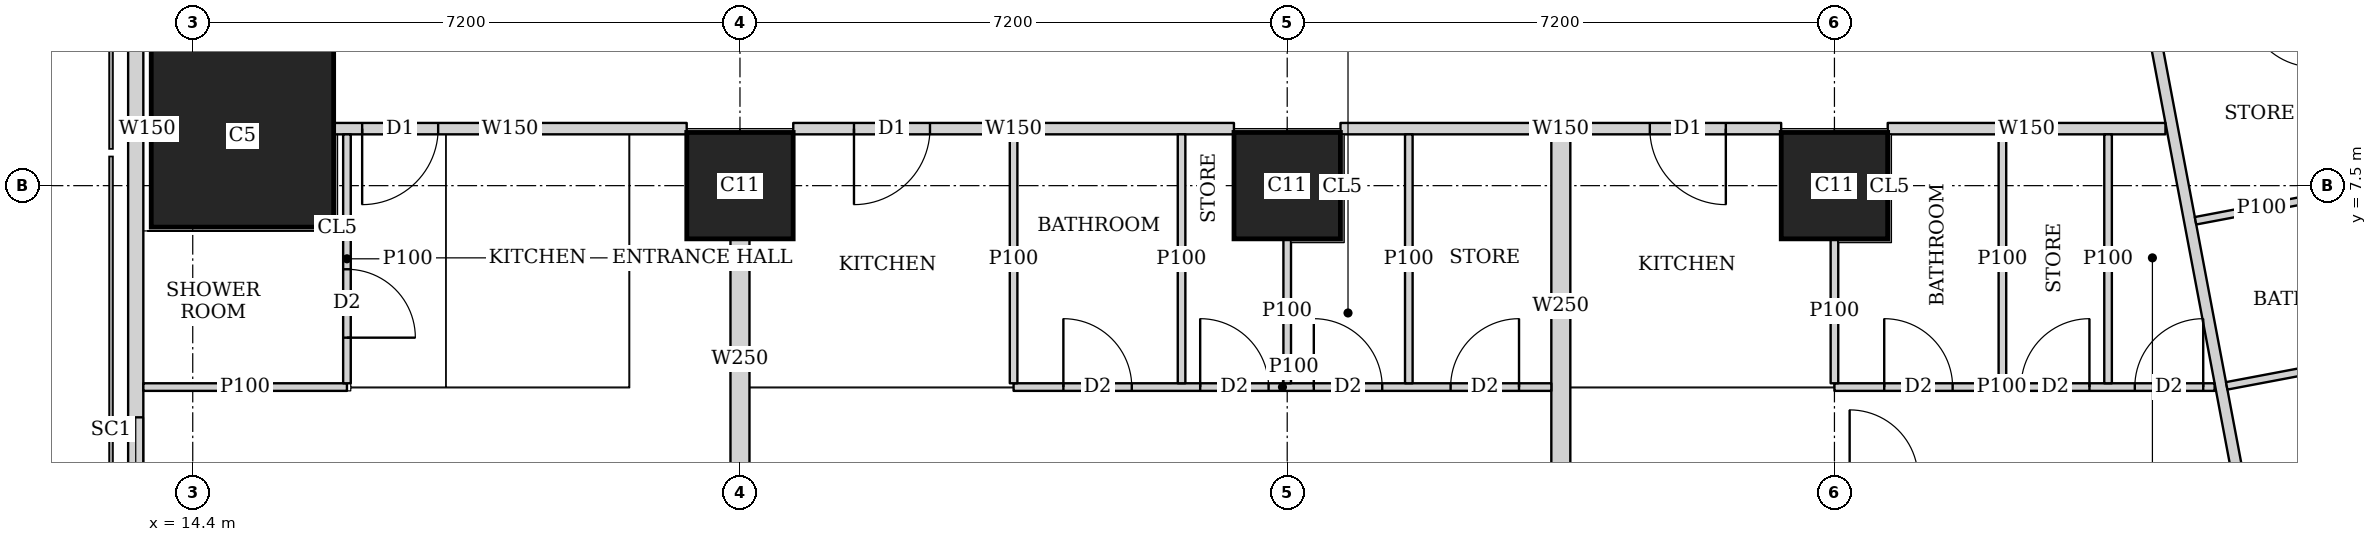
"""IFC4 building model, lengths in metres.
Left out: names, types, materials, properties, quantities, classifications, styles, units other than length and angle.
Written with IfcOpenShell. Run it as: python <this file> out.ifc"""

import sys

from ifc_helpers import new_model, si_unit, direction, frame, frame_2d, origin, origin_2d, place, context, subcontext, project, spatial, rectangle, extrude, element, fill, save


model = new_model("IFC4")
c1 = context("Model", 3, precision=1e-05, world=origin(), true_north=direction((0.0, 1.0)))
c2 = subcontext(c1, "Body", "Model", "MODEL_VIEW")
j1 = project(units=[si_unit("LENGTHUNIT", "METRE"), si_unit("PLANEANGLEUNIT", "RADIAN")], contexts=[c1])
p1 = place(None, origin())
s1 = spatial("IfcSite", under=j1, at=p1, CompositionType="ELEMENT")
p2 = place(p1, origin())
s2 = spatial("IfcBuilding", under=s1, at=p2, CompositionType="ELEMENT")
p3 = place(p2, frame((0.0, 0.0, 242.45)))
s3 = spatial("IfcBuildingStorey", under=s2, at=p3, CompositionType="ELEMENT", Elevation=242.45)
p4 = place(p3, frame((15.054, 8.154, 0.0), z_axis=(0.0, 0.0, 1.0), x_axis=(1.0, 0.0, 0.0)))
e1 = element("IfcColumn", 1, at=p4, inside=s3, PredefinedType="COLUMN", context=c2, shape_type="SweptSolid", body=[
    extrude(rectangle(XDim=2.4, YDim=2.4, at=origin_2d()), origin(), (0.0, 0.0, 1.0), 3.75),
])
for number, where, z_axis, x_axis in (
    (2, (21.6, 7.5, 0.0), (0.0, 0.0, 1.0), (1.0, 0.0, 0.0)),
    (3, (28.8, 7.5, 0.0), (0.0, 0.0, 1.0), (1.0, 0.0, 0.0)),
    (4, (36.0, 7.5, 0.0), (0.0, 0.0, 1.0), (1.0, 0.0, 0.0)),
):
    element("IfcColumn", number, at=place(p3, frame(where, z_axis=z_axis, x_axis=x_axis)), inside=s3, PredefinedType="COLUMN", context=c2, shape_type="SweptSolid", body=[
        extrude(rectangle(XDim=1.4, YDim=1.4, at=origin_2d()), origin(), (0.0, 0.0, 1.0), 3.75),
    ])
p5 = place(p3, frame((13.65, 44.837, 0.0), z_axis=(0.0, 0.0, 1.0), x_axis=(0.0, -1.0, 0.0)))
e5 = element("IfcWall", 5, at=p5, inside=s3, PredefinedType="SOLIDWALL", context=c2, shape_type="SweptSolid", body=[
    extrude(rectangle(XDim=44.674, YDim=0.2, at=frame_2d((22.337, 0.0))), origin(), (0.0, 0.0, 1.0), 3.45),
])
p6 = place(p5, frame((1.889, 0.0, 0.9)))
e6 = element("IfcOpeningElement", 6, at=p6, cuts=e5, PredefinedType="OPENING", context=c2, shape_type="SweptSolid", body=[
    extrude(rectangle(XDim=2.4, YDim=1.5, at=frame_2d((1.2, 0.75))), frame((0.0, 0.11, 0.0), z_axis=(0.0, -1.0, 0.0), x_axis=(1.0, 0.0, 0.0)), (0.0, 0.0, 1.0), 0.22),
])
p7 = place(p5, frame((40.385, 0.0, 0.9)))
e7 = element("IfcOpeningElement", 7, at=p7, cuts=e5, PredefinedType="OPENING", context=c2, shape_type="SweptSolid", body=[
    extrude(rectangle(XDim=2.4, YDim=1.5, at=frame_2d((1.2, 0.75))), frame((0.0, 0.11, 0.0), z_axis=(0.0, -1.0, 0.0), x_axis=(1.0, 0.0, 0.0)), (0.0, 0.0, 1.0), 0.22),
])
p8 = place(p3, frame((40.355, 8.25, 0.0), z_axis=(0.0, 0.0, 1.0), x_axis=(-1.0, 0.0, 0.0)))
e8 = element("IfcWall", 8, at=p8, inside=s3, PredefinedType="SOLIDWALL", context=c2, shape_type="SweptSolid", body=[
    extrude(rectangle(XDim=3.654, YDim=0.15, at=frame_2d((1.827, 0.0))), origin(), (0.0, 0.0, 1.0), 3.45),
])
p9 = place(p3, frame((35.299, 8.25, 0.0), z_axis=(0.0, 0.0, 1.0), x_axis=(-1.0, 0.0, 0.0)))
e9 = element("IfcWall", 9, at=p9, inside=s3, PredefinedType="SOLIDWALL", context=c2, shape_type="SweptSolid", body=[
    extrude(rectangle(XDim=5.798, YDim=0.15, at=frame_2d((2.899, 0.0))), origin(), (0.0, 0.0, 1.0), 3.45),
])
p10 = place(p9, frame((0.728, 0.0, 0.0)))
e10 = element("IfcOpeningElement", 10, at=p10, cuts=e9, PredefinedType="OPENING", context=c2, shape_type="SweptSolid", body=[
    extrude(rectangle(XDim=1.0, YDim=2.1, at=frame_2d((0.5, 1.05))), frame((0.0, 0.085, 0.0), z_axis=(0.0, -1.0, 0.0), x_axis=(1.0, 0.0, 0.0)), (0.0, 0.0, 1.0), 0.17),
])
p11 = place(p3, frame((28.099, 8.25, 0.0), z_axis=(0.0, 0.0, 1.0), x_axis=(-1.0, 0.0, 0.0)))
e11 = element("IfcWall", 11, at=p11, inside=s3, PredefinedType="SOLIDWALL", context=c2, shape_type="SweptSolid", body=[
    extrude(rectangle(XDim=5.798, YDim=0.15, at=frame_2d((2.899, 0.0))), origin(), (0.0, 0.0, 1.0), 3.45),
])
p12 = place(p11, frame((3.999, 0.0, 0.0)))
e12 = element("IfcOpeningElement", 12, at=p12, cuts=e11, PredefinedType="OPENING", context=c2, shape_type="SweptSolid", body=[
    extrude(rectangle(XDim=1.0, YDim=2.1, at=frame_2d((0.5, 1.05))), frame((0.0, 0.085, 0.0), z_axis=(0.0, -1.0, 0.0), x_axis=(1.0, 0.0, 0.0)), (0.0, 0.0, 1.0), 0.17),
])
p13 = place(p3, frame((20.899, 8.25, 0.0), z_axis=(0.0, 0.0, 1.0), x_axis=(-1.0, 0.0, 0.0)))
e13 = element("IfcWall", 13, at=p13, inside=s3, PredefinedType="SOLIDWALL", context=c2, shape_type="SweptSolid", body=[
    extrude(rectangle(XDim=4.644, YDim=0.15, at=frame_2d((2.322, 0.0))), origin(), (0.0, 0.0, 1.0), 3.45),
])
p14 = place(p13, frame((3.27, 0.0, 0.0)))
e14 = element("IfcOpeningElement", 14, at=p14, cuts=e13, PredefinedType="OPENING", context=c2, shape_type="SweptSolid", body=[
    extrude(rectangle(XDim=1.0, YDim=2.1, at=frame_2d((0.5, 1.05))), frame((0.0, 0.085, 0.0), z_axis=(0.0, -1.0, 0.0), x_axis=(1.0, 0.0, 0.0)), (0.0, 0.0, 1.0), 0.17),
])
p15 = place(p3, frame((13.853, 8.25, 0.0), z_axis=(0.0, 0.0, 1.0), x_axis=(-1.0, 0.0, 0.0)))
e15 = element("IfcWall", 15, at=p15, inside=s3, PredefinedType="SOLIDWALL", context=c2, shape_type="SweptSolid", body=[
    extrude(rectangle(XDim=0.103, YDim=0.15, at=frame_2d((0.052, 0.0))), origin(), (0.0, 0.0, 1.0), 3.45),
])
p16 = place(p3, frame((33.933, 42.73, 0.0), z_axis=(0.0, 0.0, 1.0), x_axis=(0.185595417643, -0.982626246825, 0.0)))
e16 = element("IfcWall", 16, at=p16, inside=s3, PredefinedType="SOLIDWALL", context=c2, shape_type="SweptSolid", body=[
    extrude(rectangle(XDim=41.051, YDim=0.15, at=frame_2d((20.525, 0.0))), origin(), (0.0, 0.0, 1.0), 2.45),
])
p17 = place(p16, frame((12.266, 0.0, 0.0)))
e17 = element("IfcOpeningElement", 17, at=p17, cuts=e16, PredefinedType="OPENING", context=c2, shape_type="SweptSolid", body=[
    extrude(rectangle(XDim=1.0, YDim=2.1, at=frame_2d((0.5, 1.05))), frame((0.0, 0.085, 0.0), z_axis=(0.0, -1.0, 0.0), x_axis=(1.0, 0.0, 0.0)), (0.0, 0.0, 1.0), 0.17),
])
p18 = place(p16, frame((16.082, 0.0, 0.0)))
e18 = element("IfcOpeningElement", 18, at=p18, cuts=e16, PredefinedType="OPENING", context=c2, shape_type="SweptSolid", body=[
    extrude(rectangle(XDim=1.0, YDim=2.1, at=frame_2d((0.5, 1.05))), frame((0.0, 0.085, 0.0), z_axis=(0.0, -1.0, 0.0), x_axis=(1.0, 0.0, 0.0)), (0.0, 0.0, 1.0), 0.17),
])
p19 = place(p16, frame((30.862, 0.0, 0.0)))
e19 = element("IfcOpeningElement", 19, at=p19, cuts=e16, PredefinedType="OPENING", context=c2, shape_type="SweptSolid", body=[
    extrude(rectangle(XDim=1.0, YDim=2.1, at=frame_2d((0.5, 1.05))), frame((0.0, 0.085, 0.0), z_axis=(0.0, -1.0, 0.0), x_axis=(1.0, 0.0, 0.0)), (0.0, 0.0, 1.0), 0.17),
])
p20 = place(p3, frame((16.429, 4.85, 0.0), z_axis=(0.0, 0.0, 1.0), x_axis=(-1.0, 0.0, 0.0)))
e20 = element("IfcWall", 20, at=p20, inside=s3, PredefinedType="PARTITIONING", context=c2, shape_type="SweptSolid", body=[
    extrude(rectangle(XDim=2.679, YDim=0.1, at=frame_2d((1.339, 0.0))), origin(), (0.0, 0.0, 1.0), 2.0),
])
p21 = place(p3, frame((16.429, 4.9, 0.0), z_axis=(0.0, 0.0, 1.0), x_axis=(0.0, 1.0, 0.0)))
e21 = element("IfcWall", 21, at=p21, inside=s3, PredefinedType="PARTITIONING", context=c2, shape_type="SweptSolid", body=[
    extrude(rectangle(XDim=3.275, YDim=0.1, at=frame_2d((1.638, 0.0))), origin(), (0.0, 0.0, 1.0), 3.45),
])
p22 = place(p21, frame((0.6, 0.0, 0.0)))
e22 = element("IfcOpeningElement", 22, at=p22, cuts=e21, PredefinedType="OPENING", context=c2, shape_type="SweptSolid", body=[
    extrude(rectangle(XDim=0.9, YDim=2.1, at=frame_2d((0.45, 1.05))), frame((0.0, 0.06, 0.0), z_axis=(0.0, -1.0, 0.0), x_axis=(1.0, 0.0, 0.0)), (0.0, 0.0, 1.0), 0.12),
])
p23 = place(p3, frame((32.275, 4.85, 0.0), z_axis=(0.0, 0.0, 1.0), x_axis=(-1.0, 0.0, 0.0)))
e23 = element("IfcWall", 23, at=p23, inside=s3, PredefinedType="PARTITIONING", context=c2, shape_type="SweptSolid", body=[
    extrude(rectangle(XDim=7.075, YDim=0.1, at=frame_2d((3.538, 0.0))), origin(), (0.0, 0.0, 1.0), 3.45),
])
p24 = place(p23, frame((5.52, 0.0, 0.0)))
e24 = element("IfcOpeningElement", 24, at=p24, cuts=e23, PredefinedType="OPENING", context=c2, shape_type="SweptSolid", body=[
    extrude(rectangle(XDim=0.9, YDim=2.1, at=frame_2d((0.45, 1.05))), frame((0.0, 0.06, 0.0), z_axis=(0.0, -1.0, 0.0), x_axis=(1.0, 0.0, 0.0)), (0.0, 0.0, 1.0), 0.12),
])
p25 = place(p23, frame((2.225, 0.0, 0.0)))
e25 = element("IfcOpeningElement", 25, at=p25, cuts=e23, PredefinedType="OPENING", context=c2, shape_type="SweptSolid", body=[
    extrude(rectangle(XDim=0.9, YDim=2.1, at=frame_2d((0.45, 1.05))), frame((0.0, 0.06, 0.0), z_axis=(0.0, -1.0, 0.0), x_axis=(1.0, 0.0, 0.0)), (0.0, 0.0, 1.0), 0.12),
])
p26 = place(p23, frame((3.72, 0.0, 0.0)))
e26 = element("IfcOpeningElement", 26, at=p26, cuts=e23, PredefinedType="OPENING", context=c2, shape_type="SweptSolid", body=[
    extrude(rectangle(XDim=0.9, YDim=2.1, at=frame_2d((0.45, 1.05))), frame((0.0, 0.06, 0.0), z_axis=(0.0, -1.0, 0.0), x_axis=(1.0, 0.0, 0.0)), (0.0, 0.0, 1.0), 0.12),
])
p27 = place(p23, frame((0.425, 0.0, 0.0)))
e27 = element("IfcOpeningElement", 27, at=p27, cuts=e23, PredefinedType="OPENING", context=c2, shape_type="SweptSolid", body=[
    extrude(rectangle(XDim=0.9, YDim=2.1, at=frame_2d((0.45, 1.05))), frame((0.0, 0.06, 0.0), z_axis=(0.0, -1.0, 0.0), x_axis=(1.0, 0.0, 0.0)), (0.0, 0.0, 1.0), 0.12),
])
p28 = place(p3, frame((25.2, 4.9, 0.0), z_axis=(0.0, 0.0, 1.0), x_axis=(0.0, 1.0, 0.0)))
e28 = element("IfcWall", 28, at=p28, inside=s3, PredefinedType="PARTITIONING", context=c2, shape_type="SweptSolid", body=[
    extrude(rectangle(XDim=3.275, YDim=0.1, at=frame_2d((1.638, 0.0))), origin(), (0.0, 0.0, 1.0), 3.45),
])
p29 = place(p3, frame((28.8, 4.9, 0.0), z_axis=(0.0, 0.0, 1.0), x_axis=(0.0, 1.0, 0.0)))
e29 = element("IfcWall", 29, at=p29, inside=s3, PredefinedType="PARTITIONING", context=c2, shape_type="SweptSolid", body=[
    extrude(rectangle(XDim=1.899, YDim=0.1, at=frame_2d((0.95, 0.0))), origin(), (0.0, 0.0, 1.0), 3.45),
])
for number, where, z_axis, x_axis in (
    (30, (27.41, 4.9, 0.0), (0.0, 0.0, 1.0), (0.0, 1.0, 0.0)),
    (31, (30.4, 4.9, 0.0), (0.0, 0.0, 1.0), (0.0, 1.0, 0.0)),
):
    element("IfcWall", number, at=place(p3, frame(where, z_axis=z_axis, x_axis=x_axis)), inside=s3, PredefinedType="PARTITIONING", context=c2, shape_type="SweptSolid", body=[
        extrude(rectangle(XDim=3.275, YDim=0.1, at=frame_2d((1.638, 0.0))), origin(), (0.0, 0.0, 1.0), 3.45),
    ])
p30 = place(p3, frame((21.6, 3.65, 0.0), z_axis=(0.0, 0.0, 1.0), x_axis=(0.0, 1.0, 0.0)))
e32 = element("IfcWall", 32, at=p30, inside=s3, PredefinedType="SOLIDWALL", context=c2, shape_type="SweptSolid", body=[
    extrude(rectangle(XDim=3.149, YDim=0.25, at=frame_2d((1.575, 0.0))), origin(), (0.0, 0.0, 1.0), 3.45),
])
p31 = place(p3, frame((41.002, 4.85, 0.0), z_axis=(0.0, 0.0, 1.0), x_axis=(-1.0, 0.0, 0.0)))
e33 = element("IfcWall", 33, at=p31, inside=s3, PredefinedType="PARTITIONING", context=c2, shape_type="SweptSolid", body=[
    extrude(rectangle(XDim=5.002, YDim=0.1, at=frame_2d((2.501, 0.0))), origin(), (0.0, 0.0, 1.0), 3.45),
])
p32 = place(p31, frame((3.447, 0.0, 0.0)))
e34 = element("IfcOpeningElement", 34, at=p32, cuts=e33, PredefinedType="OPENING", context=c2, shape_type="SweptSolid", body=[
    extrude(rectangle(XDim=0.9, YDim=2.1, at=frame_2d((0.45, 1.05))), frame((0.0, 0.06, 0.0), z_axis=(0.0, -1.0, 0.0), x_axis=(1.0, 0.0, 0.0)), (0.0, 0.0, 1.0), 0.12),
])
p33 = place(p31, frame((0.15, 0.0, 0.0)))
e35 = element("IfcOpeningElement", 35, at=p33, cuts=e33, PredefinedType="OPENING", context=c2, shape_type="SweptSolid", body=[
    extrude(rectangle(XDim=0.9, YDim=2.1, at=frame_2d((0.45, 1.05))), frame((0.0, 0.06, 0.0), z_axis=(0.0, -1.0, 0.0), x_axis=(1.0, 0.0, 0.0)), (0.0, 0.0, 1.0), 0.12),
])
p34 = place(p31, frame((1.647, 0.0, 0.0)))
e36 = element("IfcOpeningElement", 36, at=p34, cuts=e33, PredefinedType="OPENING", context=c2, shape_type="SweptSolid", body=[
    extrude(rectangle(XDim=0.9, YDim=2.1, at=frame_2d((0.45, 1.05))), frame((0.0, 0.06, 0.0), z_axis=(0.0, -1.0, 0.0), x_axis=(1.0, 0.0, 0.0)), (0.0, 0.0, 1.0), 0.12),
])
p35 = place(p3, frame((36.0, 4.9, 0.0), z_axis=(0.0, 0.0, 1.0), x_axis=(0.0, 1.0, 0.0)))
e37 = element("IfcWall", 37, at=p35, inside=s3, PredefinedType="PARTITIONING", context=c2, shape_type="SweptSolid", body=[
    extrude(rectangle(XDim=1.899, YDim=0.1, at=frame_2d((0.95, 0.0))), origin(), (0.0, 0.0, 1.0), 3.45),
])
for number, where, z_axis, x_axis in (
    (38, (39.6, 4.9, 0.0), (0.0, 0.0, 1.0), (0.0, 1.0, 0.0)),
    (39, (38.21, 4.9, 0.0), (0.0, 0.0, 1.0), (0.0, 1.0, 0.0)),
):
    element("IfcWall", number, at=place(p3, frame(where, z_axis=z_axis, x_axis=x_axis)), inside=s3, PredefinedType="PARTITIONING", context=c2, shape_type="SweptSolid", body=[
        extrude(rectangle(XDim=3.275, YDim=0.1, at=frame_2d((1.638, 0.0))), origin(), (0.0, 0.0, 1.0), 3.45),
    ])
p36 = place(p3, frame((32.4, 3.65, 0.0), z_axis=(0.0, 0.0, 1.0), x_axis=(0.0, 1.0, 0.0)))
e40 = element("IfcWall", 40, at=p36, inside=s3, PredefinedType="SOLIDWALL", context=c2, shape_type="SweptSolid", body=[
    extrude(rectangle(XDim=4.525, YDim=0.25, at=frame_2d((2.263, 0.0))), origin(), (0.0, 0.0, 1.0), 3.45),
])
p37 = place(p3, frame((42.49, 7.367, 0.0), z_axis=(0.0, 0.0, 1.0), x_axis=(-0.982585223885, -0.185812480215, 0.0)))
e41 = element("IfcWall", 41, at=p37, inside=s3, PredefinedType="PARTITIONING", context=c2, shape_type="SweptSolid", body=[
    extrude(rectangle(XDim=1.77, YDim=0.1, at=frame_2d((0.885, 0.0))), origin(), (0.0, 0.0, 1.0), 3.45),
])
p38 = place(p3, frame((44.379, 5.474, 0.0), z_axis=(0.0, 0.0, 1.0), x_axis=(-0.982607026909, -0.185697147715, 0.0)))
e42 = element("IfcWall", 42, at=p38, inside=s3, PredefinedType="PARTITIONING", context=c2, shape_type="SweptSolid", body=[
    extrude(rectangle(XDim=3.275, YDim=0.1, at=frame_2d((1.637, 0.0))), origin(), (0.0, 0.0, 1.0), 3.45),
])
p39 = place(p7, origin())
e43 = element("IfcWindow", 43, at=p39, inside=s3, PartitioningType="SINGLE_PANEL", PredefinedType="WINDOW", context=c2, shape_type="SweptSolid", body=[
    extrude(rectangle(XDim=2.4, YDim=1.5, at=frame_2d((1.2, 0.75))), frame((0.0, 0.03, 0.0), z_axis=(0.0, -1.0, 0.0), x_axis=(1.0, 0.0, 0.0)), (0.0, 0.0, 1.0), 0.06),
])
fill(e7, e43)
p40 = place(p22, origin())
e44 = element("IfcDoor", 44, at=p40, inside=s3, OperationType="SINGLE_SWING_RIGHT", PredefinedType="DOOR", context=c2, shape_type="SweptSolid", body=[
    extrude(rectangle(XDim=0.9, YDim=2.1, at=frame_2d((0.45, 1.05))), frame((0.0, 0.025, 0.0), z_axis=(0.0, -1.0, 0.0), x_axis=(1.0, 0.0, 0.0)), (0.0, 0.0, 1.0), 0.05),
])
fill(e22, e44)
p41 = place(p14, origin())
e45 = element("IfcDoor", 45, at=p41, inside=s3, OperationType="SINGLE_SWING_RIGHT", PredefinedType="DOOR", context=c2, shape_type="SweptSolid", body=[
    extrude(rectangle(XDim=1.0, YDim=2.1, at=frame_2d((0.5, 1.05))), frame((0.0, 0.025, 0.0), z_axis=(0.0, -1.0, 0.0), x_axis=(1.0, 0.0, 0.0)), (0.0, 0.0, 1.0), 0.05),
])
fill(e14, e45)
p42 = place(p24, origin())
e46 = element("IfcDoor", 46, at=p42, inside=s3, OperationType="SINGLE_SWING_LEFT", PredefinedType="DOOR", context=c2, shape_type="SweptSolid", body=[
    extrude(rectangle(XDim=0.9, YDim=2.1, at=frame_2d((0.45, 1.05))), frame((0.0, 0.025, 0.0), z_axis=(0.0, -1.0, 0.0), x_axis=(1.0, 0.0, 0.0)), (0.0, 0.0, 1.0), 0.05),
])
fill(e24, e46)
p43 = place(p25, origin())
e47 = element("IfcDoor", 47, at=p43, inside=s3, OperationType="SINGLE_SWING_LEFT", PredefinedType="DOOR", context=c2, shape_type="SweptSolid", body=[
    extrude(rectangle(XDim=0.9, YDim=2.1, at=frame_2d((0.45, 1.05))), frame((0.0, 0.025, 0.0), z_axis=(0.0, -1.0, 0.0), x_axis=(1.0, 0.0, 0.0)), (0.0, 0.0, 1.0), 0.05),
])
fill(e25, e47)
p44 = place(p26, origin())
e48 = element("IfcDoor", 48, at=p44, inside=s3, OperationType="SINGLE_SWING_LEFT", PredefinedType="DOOR", context=c2, shape_type="SweptSolid", body=[
    extrude(rectangle(XDim=0.9, YDim=2.1, at=frame_2d((0.45, 1.05))), frame((0.0, 0.025, 0.0), z_axis=(0.0, -1.0, 0.0), x_axis=(1.0, 0.0, 0.0)), (0.0, 0.0, 1.0), 0.05),
])
fill(e26, e48)
p45 = place(p27, origin())
e49 = element("IfcDoor", 49, at=p45, inside=s3, OperationType="SINGLE_SWING_RIGHT", PredefinedType="DOOR", context=c2, shape_type="SweptSolid", body=[
    extrude(rectangle(XDim=0.9, YDim=2.1, at=frame_2d((0.45, 1.05))), frame((0.0, 0.025, 0.0), z_axis=(0.0, -1.0, 0.0), x_axis=(1.0, 0.0, 0.0)), (0.0, 0.0, 1.0), 0.05),
])
fill(e27, e49)
p46 = place(p12, origin())
e50 = element("IfcDoor", 50, at=p46, inside=s3, OperationType="SINGLE_SWING_RIGHT", PredefinedType="DOOR", context=c2, shape_type="SweptSolid", body=[
    extrude(rectangle(XDim=1.0, YDim=2.1, at=frame_2d((0.5, 1.05))), frame((0.0, 0.025, 0.0), z_axis=(0.0, -1.0, 0.0), x_axis=(1.0, 0.0, 0.0)), (0.0, 0.0, 1.0), 0.05),
])
fill(e12, e50)
p47 = place(p32, origin())
e51 = element("IfcDoor", 51, at=p47, inside=s3, OperationType="SINGLE_SWING_LEFT", PredefinedType="DOOR", context=c2, shape_type="SweptSolid", body=[
    extrude(rectangle(XDim=0.9, YDim=2.1, at=frame_2d((0.45, 1.05))), frame((0.0, 0.025, 0.0), z_axis=(0.0, -1.0, 0.0), x_axis=(1.0, 0.0, 0.0)), (0.0, 0.0, 1.0), 0.05),
])
fill(e34, e51)
p48 = place(p33, origin())
e52 = element("IfcDoor", 52, at=p48, inside=s3, OperationType="SINGLE_SWING_RIGHT", PredefinedType="DOOR", context=c2, shape_type="SweptSolid", body=[
    extrude(rectangle(XDim=0.9, YDim=2.1, at=frame_2d((0.45, 1.05))), frame((0.0, 0.025, 0.0), z_axis=(0.0, -1.0, 0.0), x_axis=(1.0, 0.0, 0.0)), (0.0, 0.0, 1.0), 0.05),
])
fill(e35, e52)
p49 = place(p34, origin())
e53 = element("IfcDoor", 53, at=p49, inside=s3, OperationType="SINGLE_SWING_RIGHT", PredefinedType="DOOR", context=c2, shape_type="SweptSolid", body=[
    extrude(rectangle(XDim=0.9, YDim=2.1, at=frame_2d((0.45, 1.05))), frame((0.0, 0.025, 0.0), z_axis=(0.0, -1.0, 0.0), x_axis=(1.0, 0.0, 0.0)), (0.0, 0.0, 1.0), 0.05),
])
fill(e36, e53)
p50 = place(p10, origin())
e54 = element("IfcDoor", 54, at=p50, inside=s3, OperationType="SINGLE_SWING_LEFT", PredefinedType="DOOR", context=c2, shape_type="SweptSolid", body=[
    extrude(rectangle(XDim=1.0, YDim=2.1, at=frame_2d((0.5, 1.05))), frame((0.0, 0.025, 0.0), z_axis=(0.0, -1.0, 0.0), x_axis=(1.0, 0.0, 0.0)), (0.0, 0.0, 1.0), 0.05),
])
fill(e10, e54)
save(model, sys.argv[1])
